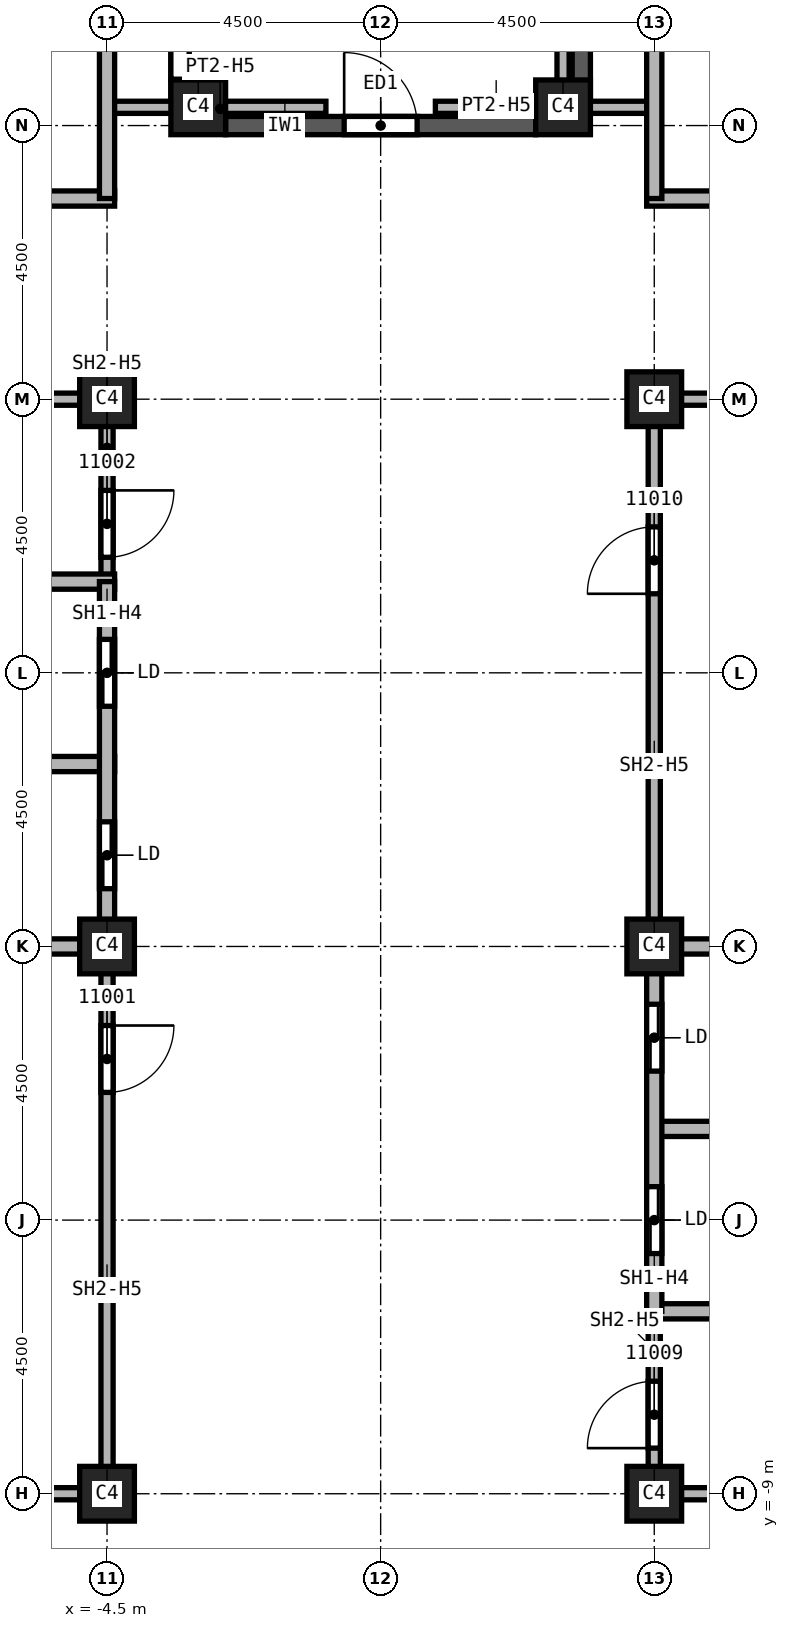
"""IFC4 building model, lengths in metres.
Left out: names, types, materials, properties, quantities, classifications, styles, units other than length and angle.
Written with IfcOpenShell. Run it as: python <this file> out.ifc"""

import sys

from ifc_helpers import new_model, si_unit, direction, frame, frame_2d, origin, origin_2d, place, context, subcontext, project, spatial, rectangle, extrude, element, fill, save


model = new_model("IFC4")
c1 = context("Model", 3, precision=1e-05, world=origin(), true_north=direction((0.0, 1.0)))
c2 = subcontext(c1, "Body", "Model", "MODEL_VIEW")
j1 = project(units=[si_unit("LENGTHUNIT", "METRE"), si_unit("PLANEANGLEUNIT", "RADIAN")], contexts=[c1])
p1 = place(None, origin())
s1 = spatial("IfcSite", under=j1, at=p1, CompositionType="ELEMENT")
p2 = place(p1, origin())
s2 = spatial("IfcBuilding", under=s1, at=p2, CompositionType="ELEMENT")
p3 = place(p2, frame((0.0, 0.0, 184.0)))
s3 = spatial("IfcBuildingStorey", under=s2, at=p3, CompositionType="ELEMENT", Elevation=184.0)
for number, where, z_axis, x_axis in (
    (1, (4.5, 0.0, 0.0), (0.0, 0.0, 1.0), (1.0, 0.0, 0.0)),
    (2, (4.5, 9.0, 0.0), (0.0, 0.0, 1.0), (1.0, 0.0, 0.0)),
    (3, (4.5, -9.0, 0.0), (0.0, 0.0, 1.0), (1.0, 0.0, 0.0)),
    (4, (-4.5, 0.0, 0.0), (0.0, 0.0, 1.0), (1.0, 0.0, 0.0)),
    (5, (-4.5, 9.0, 0.0), (0.0, 0.0, 1.0), (1.0, 0.0, 0.0)),
    (6, (-4.5, -9.0, 0.0), (0.0, 0.0, 1.0), (1.0, 0.0, 0.0)),
    (7, (3.0, 13.8, 0.0), (0.0, 0.0, 1.0), (1.0, 0.0, 0.0)),
    (8, (-3.0, 13.8, 0.0), (0.0, 0.0, 1.0), (1.0, 0.0, 0.0)),
):
    element("IfcColumn", number, at=place(p3, frame(where, z_axis=z_axis, x_axis=x_axis)), inside=s3, PredefinedType="COLUMN", context=c2, shape_type="SweptSolid", body=[
        extrude(rectangle(XDim=0.9, YDim=0.9, at=origin_2d()), origin(), (0.0, 0.0, 1.0), 3.72),
    ])
p4 = place(p3, frame((3.3, 22.3, 0.0), z_axis=(0.0, 0.0, 1.0), x_axis=(0.0, -1.0, 0.0)))
e9 = element("IfcWall", 9, at=p4, inside=s3, PredefinedType="SOLIDWALL", context=c2, shape_type="SweptSolid", body=[
    extrude(rectangle(XDim=8.45, YDim=0.3, at=frame_2d((4.225, 0.0))), origin(), (0.0, 0.0, 1.0), 3.12),
])
p5 = place(p4, frame((0.812, 0.0, 0.8)))
e10 = element("IfcOpeningElement", 10, at=p5, cuts=e9, PredefinedType="OPENING", context=c2, shape_type="SweptSolid", body=[
    extrude(rectangle(XDim=2.4, YDim=1.95, at=frame_2d((1.2, 0.975))), frame((0.0, 0.15, 0.0), z_axis=(0.0, -1.0, 0.0), x_axis=(1.0, 0.0, 0.0)), (0.0, 0.0, 1.0), 0.3),
])
p6 = place(p4, frame((4.837, 0.0, 0.8)))
e11 = element("IfcOpeningElement", 11, at=p6, cuts=e9, PredefinedType="OPENING", context=c2, shape_type="SweptSolid", body=[
    extrude(rectangle(XDim=2.4, YDim=1.95, at=frame_2d((1.2, 0.975))), frame((0.0, 0.15, 0.0), z_axis=(0.0, -1.0, 0.0), x_axis=(1.0, 0.0, 0.0)), (0.0, 0.0, 1.0), 0.3),
])
p7 = place(p3, frame((-2.55, 13.5, 0.0), z_axis=(0.0, 0.0, 1.0), x_axis=(1.0, 0.0, 0.0)))
e12 = element("IfcWall", 12, at=p7, inside=s3, PredefinedType="SOLIDWALL", context=c2, shape_type="SweptSolid", body=[
    extrude(rectangle(XDim=5.1, YDim=0.3, at=frame_2d((2.55, 0.0))), origin(), (0.0, 0.0, 1.0), 3.12),
])
p8 = place(p7, frame((1.95, 0.0, 0.0)))
e13 = element("IfcOpeningElement", 13, at=p8, cuts=e12, PredefinedType="OPENING", context=c2, shape_type="SweptSolid", body=[
    extrude(rectangle(XDim=1.2, YDim=2.4, at=frame_2d((0.6, 1.2))), frame((0.0, 0.15, 0.0), z_axis=(0.0, -1.0, 0.0), x_axis=(1.0, 0.0, 0.0)), (0.0, 0.0, 1.0), 0.3),
])
p9 = place(p3, frame((-3.3, 13.85, 0.0), z_axis=(0.0, 0.0, 1.0), x_axis=(0.0, 1.0, 0.0)))
e14 = element("IfcWall", 14, at=p9, inside=s3, PredefinedType="SOLIDWALL", context=c2, shape_type="SweptSolid", body=[
    extrude(rectangle(XDim=8.45, YDim=0.3, at=frame_2d((4.225, 0.0))), origin(), (0.0, 0.0, 1.0), 3.12),
])
p10 = place(p9, frame((0.413, 0.0, 0.8)))
e15 = element("IfcOpeningElement", 15, at=p10, cuts=e14, PredefinedType="OPENING", context=c2, shape_type="SweptSolid", body=[
    extrude(rectangle(XDim=2.4, YDim=1.95, at=frame_2d((1.2, 0.975))), frame((0.0, 0.15, 0.0), z_axis=(0.0, -1.0, 0.0), x_axis=(1.0, 0.0, 0.0)), (0.0, 0.0, 1.0), 0.3),
])
p11 = place(p9, frame((4.438, 0.0, 0.8)))
e16 = element("IfcOpeningElement", 16, at=p11, cuts=e14, PredefinedType="OPENING", context=c2, shape_type="SweptSolid", body=[
    extrude(rectangle(XDim=2.4, YDim=1.95, at=frame_2d((1.2, 0.975))), frame((0.0, 0.15, 0.0), z_axis=(0.0, -1.0, 0.0), x_axis=(1.0, 0.0, 0.0)), (0.0, 0.0, 1.0), 0.3),
])
for number, where, z_axis, x_axis in (
    (17, (-4.5, 13.8, 0.0), (0.0, 0.0, 1.0), (1.0, 0.0, 0.0)),
    (18, (0.9, 13.8, 0.0), (0.0, 0.0, 1.0), (1.0, 0.0, 0.0)),
):
    element("IfcWall", number, at=place(p3, frame(where, z_axis=z_axis, x_axis=x_axis)), inside=s3, PredefinedType="PARTITIONING", context=c2, shape_type="SweptSolid", body=[
        extrude(rectangle(XDim=3.6, YDim=0.2, at=frame_2d((1.8, 0.0))), origin(), (0.0, 0.0, 1.0), 3.113),
    ])
p12 = place(p3, frame((3.0, 22.3, 0.0), z_axis=(0.0, 0.0, 1.0), x_axis=(0.0, -1.0, 0.0)))
e19 = element("IfcWall", 19, at=p12, inside=s3, PredefinedType="PARTITIONING", context=c2, shape_type="SweptSolid", body=[
    extrude(rectangle(XDim=8.5, YDim=0.2, at=frame_2d((4.25, 0.0))), origin(), (0.0, 0.0, 1.0), 2.874),
])
for number, where, z_axis, x_axis in (
    (20, (-7.5, 9.0, 0.0), (0.0, 0.0, 1.0), (1.0, 0.0, 0.0)),
    (21, (-4.5, -9.0, 0.0), (0.0, 0.0, 1.0), (-1.0, 0.0, 0.0)),
):
    element("IfcWall", number, at=place(p3, frame(where, z_axis=z_axis, x_axis=x_axis)), inside=s3, PredefinedType="SOLIDWALL", context=c2, shape_type="SweptSolid", body=[
        extrude(rectangle(XDim=3.0, YDim=0.2, at=frame_2d((1.5, 0.0))), origin(), (0.0, 0.0, 1.0), 2.958),
    ])
p13 = place(p3, frame((-4.5, 0.0, 0.0), z_axis=(0.0, 0.0, 1.0), x_axis=(0.0, -1.0, 0.0)))
e22 = element("IfcWall", 22, at=p13, inside=s3, PredefinedType="SOLIDWALL", context=c2, shape_type="SweptSolid", body=[
    extrude(rectangle(XDim=9.1, YDim=0.2, at=frame_2d((4.55, 0.0))), origin(), (0.0, 0.0, 1.0), 2.958),
])
p14 = place(p13, frame((1.3, 0.0, 0.0)))
e23 = element("IfcOpeningElement", 23, at=p14, cuts=e22, PredefinedType="OPENING", context=c2, shape_type="SweptSolid", body=[
    extrude(rectangle(XDim=1.1, YDim=2.1, at=frame_2d((0.55, 1.05))), frame((0.0, 0.1, 0.0), z_axis=(0.0, -1.0, 0.0), x_axis=(1.0, 0.0, 0.0)), (0.0, 0.0, 1.0), 0.2),
])
p15 = place(p3, frame((-4.5, 9.1, 0.0), z_axis=(0.0, 0.0, 1.0), x_axis=(0.0, -1.0, 0.0)))
e24 = element("IfcWall", 24, at=p15, inside=s3, PredefinedType="SOLIDWALL", context=c2, shape_type="SweptSolid", body=[
    extrude(rectangle(XDim=3.1, YDim=0.2, at=frame_2d((1.55, 0.0))), origin(), (0.0, 0.0, 1.0), 2.958),
])
p16 = place(p15, frame((1.6, 0.0, 0.0)))
e25 = element("IfcOpeningElement", 25, at=p16, cuts=e24, PredefinedType="OPENING", context=c2, shape_type="SweptSolid", body=[
    extrude(rectangle(XDim=1.1, YDim=2.1, at=frame_2d((0.55, 1.05))), frame((0.0, 0.1, 0.0), z_axis=(0.0, -1.0, 0.0), x_axis=(1.0, 0.0, 0.0)), (0.0, 0.0, 1.0), 0.2),
])
p17 = place(p3, frame((4.5, -9.1, 0.0), z_axis=(0.0, 0.0, 1.0), x_axis=(0.0, 1.0, 0.0)))
e26 = element("IfcWall", 26, at=p17, inside=s3, PredefinedType="SOLIDWALL", context=c2, shape_type="SweptSolid", body=[
    extrude(rectangle(XDim=3.1, YDim=0.2, at=frame_2d((1.55, 0.0))), origin(), (0.0, 0.0, 1.0), 2.958),
])
p18 = place(p17, frame((0.85, 0.0, 0.0)))
e27 = element("IfcOpeningElement", 27, at=p18, cuts=e26, PredefinedType="OPENING", context=c2, shape_type="SweptSolid", body=[
    extrude(rectangle(XDim=1.1, YDim=2.1, at=frame_2d((0.55, 1.05))), frame((0.0, 0.1, 0.0), z_axis=(0.0, -1.0, 0.0), x_axis=(1.0, 0.0, 0.0)), (0.0, 0.0, 1.0), 0.2),
])
p19 = place(p3, frame((4.5, 0.0, 0.0), z_axis=(0.0, 0.0, 1.0), x_axis=(0.0, 1.0, 0.0)))
e28 = element("IfcWall", 28, at=p19, inside=s3, PredefinedType="SOLIDWALL", context=c2, shape_type="SweptSolid", body=[
    extrude(rectangle(XDim=9.1, YDim=0.2, at=frame_2d((4.55, 0.0))), origin(), (0.0, 0.0, 1.0), 2.958),
])
p20 = place(p19, frame((5.8, 0.0, 0.0)))
e29 = element("IfcOpeningElement", 29, at=p20, cuts=e28, PredefinedType="OPENING", context=c2, shape_type="SweptSolid", body=[
    extrude(rectangle(XDim=1.1, YDim=2.1, at=frame_2d((0.55, 1.05))), frame((0.0, 0.1, 0.0), z_axis=(0.0, -1.0, 0.0), x_axis=(1.0, 0.0, 0.0)), (0.0, 0.0, 1.0), 0.2),
])
for number, where, z_axis, x_axis in (
    (30, (4.5, 9.0, 0.0), (0.0, 0.0, 1.0), (1.0, 0.0, 0.0)),
    (31, (7.5, -9.0, 0.0), (0.0, 0.0, 1.0), (-1.0, 0.0, 0.0)),
):
    element("IfcWall", number, at=place(p3, frame(where, z_axis=z_axis, x_axis=x_axis)), inside=s3, PredefinedType="SOLIDWALL", context=c2, shape_type="SweptSolid", body=[
        extrude(rectangle(XDim=3.0, YDim=0.2, at=frame_2d((1.5, 0.0))), origin(), (0.0, 0.0, 1.0), 2.958),
    ])
p21 = place(p3, frame((-13.625, 3.0, 0.0), z_axis=(0.0, 0.0, 1.0), x_axis=(1.0, 0.0, 0.0)))
e32 = element("IfcWall", 32, at=p21, inside=s3, PredefinedType="SOLIDWALL", context=c2, shape_type="SweptSolid", body=[
    extrude(rectangle(XDim=9.25, YDim=0.25, at=frame_2d((4.625, 0.0))), origin(), (0.0, 0.0, 1.0), 3.72),
])
p22 = place(p21, frame((3.25, 0.0, 0.0)))
e33 = element("IfcOpeningElement", 33, at=p22, cuts=e32, PredefinedType="OPENING", context=c2, shape_type="SweptSolid", body=[
    extrude(rectangle(XDim=1.1, YDim=2.1, at=frame_2d((0.55, 1.05))), frame((0.0, 0.125, 0.0), z_axis=(0.0, -1.0, 0.0), x_axis=(1.0, 0.0, 0.0)), (0.0, 0.0, 1.0), 0.25),
])
for number, where, z_axis, x_axis in (
    (34, (-7.625, 0.0, 0.0), (0.0, 0.0, 1.0), (1.0, 0.0, 0.0)),
    (35, (-7.625, 6.0, 0.0), (0.0, 0.0, 1.0), (1.0, 0.0, 0.0)),
):
    element("IfcWall", number, at=place(p3, frame(where, z_axis=z_axis, x_axis=x_axis)), inside=s3, PredefinedType="SOLIDWALL", context=c2, shape_type="SweptSolid", body=[
        extrude(rectangle(XDim=3.25, YDim=0.25, at=frame_2d((1.625, 0.0))), origin(), (0.0, 0.0, 1.0), 3.72),
    ])
p23 = place(p3, frame((-4.5, 6.0, 0.0), z_axis=(0.0, 0.0, 1.0), x_axis=(0.0, -1.0, 0.0)))
e36 = element("IfcWall", 36, at=p23, inside=s3, PredefinedType="SOLIDWALL", context=c2, shape_type="SweptSolid", body=[
    extrude(rectangle(XDim=6.0, YDim=0.25, at=frame_2d((3.0, 0.0))), origin(), (0.0, 0.0, 1.0), 2.958),
])
p24 = place(p23, frame((3.95, 0.0, 0.0)))
e37 = element("IfcOpeningElement", 37, at=p24, cuts=e36, PredefinedType="OPENING", context=c2, shape_type="SweptSolid", body=[
    extrude(rectangle(XDim=1.1, YDim=2.1, at=frame_2d((0.55, 1.05))), frame((0.0, 0.125, 0.0), z_axis=(0.0, -1.0, 0.0), x_axis=(1.0, 0.0, 0.0)), (0.0, 0.0, 1.0), 0.25),
])
p25 = place(p23, frame((0.95, 0.0, 0.0)))
e38 = element("IfcOpeningElement", 38, at=p25, cuts=e36, PredefinedType="OPENING", context=c2, shape_type="SweptSolid", body=[
    extrude(rectangle(XDim=1.1, YDim=2.1, at=frame_2d((0.55, 1.05))), frame((0.0, 0.125, 0.0), z_axis=(0.0, -1.0, 0.0), x_axis=(1.0, 0.0, 0.0)), (0.0, 0.0, 1.0), 0.25),
])
p26 = place(p3, frame((4.375, -6.0, 0.0), z_axis=(0.0, 0.0, 1.0), x_axis=(1.0, 0.0, 0.0)))
e39 = element("IfcWall", 39, at=p26, inside=s3, PredefinedType="SOLIDWALL", context=c2, shape_type="SweptSolid", body=[
    extrude(rectangle(XDim=3.25, YDim=0.25, at=frame_2d((1.625, 0.0))), origin(), (0.0, 0.0, 1.0), 3.72),
])
p27 = place(p3, frame((4.375, -3.0, 0.0), z_axis=(0.0, 0.0, 1.0), x_axis=(1.0, 0.0, 0.0)))
e40 = element("IfcWall", 40, at=p27, inside=s3, PredefinedType="SOLIDWALL", context=c2, shape_type="SweptSolid", body=[
    extrude(rectangle(XDim=9.25, YDim=0.25, at=frame_2d((4.625, 0.0))), origin(), (0.0, 0.0, 1.0), 3.72),
])
p28 = place(p27, frame((4.125, 0.0, 0.0)))
e41 = element("IfcOpeningElement", 41, at=p28, cuts=e40, PredefinedType="OPENING", context=c2, shape_type="SweptSolid", body=[
    extrude(rectangle(XDim=1.1, YDim=2.1, at=frame_2d((0.55, 1.05))), frame((0.0, 0.125, 0.0), z_axis=(0.0, -1.0, 0.0), x_axis=(1.0, 0.0, 0.0)), (0.0, 0.0, 1.0), 0.25),
])
p29 = place(p3, frame((4.375, 0.0, 0.0), z_axis=(0.0, 0.0, 1.0), x_axis=(1.0, 0.0, 0.0)))
e42 = element("IfcWall", 42, at=p29, inside=s3, PredefinedType="SOLIDWALL", context=c2, shape_type="SweptSolid", body=[
    extrude(rectangle(XDim=3.25, YDim=0.25, at=frame_2d((1.625, 0.0))), origin(), (0.0, 0.0, 1.0), 3.72),
])
p30 = place(p3, frame((4.5, -6.0, 0.0), z_axis=(0.0, 0.0, 1.0), x_axis=(0.0, 1.0, 0.0)))
e43 = element("IfcWall", 43, at=p30, inside=s3, PredefinedType="SOLIDWALL", context=c2, shape_type="SweptSolid", body=[
    extrude(rectangle(XDim=6.0, YDim=0.25, at=frame_2d((3.0, 0.0))), origin(), (0.0, 0.0, 1.0), 2.958),
])
p31 = place(p30, frame((0.95, 0.0, 0.0)))
e44 = element("IfcOpeningElement", 44, at=p31, cuts=e43, PredefinedType="OPENING", context=c2, shape_type="SweptSolid", body=[
    extrude(rectangle(XDim=1.1, YDim=2.1, at=frame_2d((0.55, 1.05))), frame((0.0, 0.125, 0.0), z_axis=(0.0, -1.0, 0.0), x_axis=(1.0, 0.0, 0.0)), (0.0, 0.0, 1.0), 0.25),
])
p32 = place(p30, frame((3.95, 0.0, 0.0)))
e45 = element("IfcOpeningElement", 45, at=p32, cuts=e43, PredefinedType="OPENING", context=c2, shape_type="SweptSolid", body=[
    extrude(rectangle(XDim=1.1, YDim=2.1, at=frame_2d((0.55, 1.05))), frame((0.0, 0.125, 0.0), z_axis=(0.0, -1.0, 0.0), x_axis=(1.0, 0.0, 0.0)), (0.0, 0.0, 1.0), 0.25),
])
p33 = place(p3, frame((-13.625, 12.3, 0.0), z_axis=(0.0, 0.0, 1.0), x_axis=(1.0, 0.0, 0.0)))
e46 = element("IfcWall", 46, at=p33, inside=s3, PredefinedType="SOLIDWALL", context=c2, shape_type="SweptSolid", body=[
    extrude(rectangle(XDim=9.25, YDim=0.25, at=frame_2d((4.625, 0.0))), origin(), (0.0, 0.0, 1.0), 3.72),
])
p34 = place(p33, frame((0.85, 0.0, 0.0)))
e47 = element("IfcOpeningElement", 47, at=p34, cuts=e46, PredefinedType="OPENING", context=c2, shape_type="SweptSolid", body=[
    extrude(rectangle(XDim=1.2, YDim=2.1, at=frame_2d((0.6, 1.05))), frame((0.0, 0.125, 0.0), z_axis=(0.0, -1.0, 0.0), x_axis=(1.0, 0.0, 0.0)), (0.0, 0.0, 1.0), 0.25),
])
p35 = place(p3, frame((-4.5, 16.8, 0.0), z_axis=(0.0, 0.0, 1.0), x_axis=(0.0, -1.0, 0.0)))
e48 = element("IfcWall", 48, at=p35, inside=s3, PredefinedType="SOLIDWALL", context=c2, shape_type="SweptSolid", body=[
    extrude(rectangle(XDim=4.5, YDim=0.25, at=frame_2d((2.25, 0.0))), origin(), (0.0, 0.0, 1.0), 3.72),
])
p36 = place(p3, frame((4.375, 12.3, 0.0), z_axis=(0.0, 0.0, 1.0), x_axis=(1.0, 0.0, 0.0)))
e49 = element("IfcWall", 49, at=p36, inside=s3, PredefinedType="SOLIDWALL", context=c2, shape_type="SweptSolid", body=[
    extrude(rectangle(XDim=9.25, YDim=0.25, at=frame_2d((4.625, 0.0))), origin(), (0.0, 0.0, 1.0), 3.72),
])
p37 = place(p36, frame((7.2, 0.0, 0.0)))
e50 = element("IfcOpeningElement", 50, at=p37, cuts=e49, PredefinedType="OPENING", context=c2, shape_type="SweptSolid", body=[
    extrude(rectangle(XDim=1.2, YDim=2.1, at=frame_2d((0.6, 1.05))), frame((0.0, 0.125, 0.0), z_axis=(0.0, -1.0, 0.0), x_axis=(1.0, 0.0, 0.0)), (0.0, 0.0, 1.0), 0.25),
])
p38 = place(p3, frame((4.5, 12.3, 0.0), z_axis=(0.0, 0.0, 1.0), x_axis=(0.0, 1.0, 0.0)))
e51 = element("IfcWall", 51, at=p38, inside=s3, PredefinedType="SOLIDWALL", context=c2, shape_type="SweptSolid", body=[
    extrude(rectangle(XDim=4.5, YDim=0.25, at=frame_2d((2.25, 0.0))), origin(), (0.0, 0.0, 1.0), 3.72),
])
p39 = place(p8, origin())
e52 = element("IfcDoor", 52, at=p39, inside=s3, OperationType="SINGLE_SWING_LEFT", PredefinedType="DOOR", context=c2, shape_type="SweptSolid", body=[
    extrude(rectangle(XDim=1.2, YDim=2.4, at=frame_2d((0.6, 1.2))), frame((0.0, 0.025, 0.0), z_axis=(0.0, -1.0, 0.0), x_axis=(1.0, 0.0, 0.0)), (0.0, 0.0, 1.0), 0.05),
])
fill(e13, e52)
p40 = place(p10, origin())
e53 = element("IfcWindow", 53, at=p40, inside=s3, PartitioningType="SINGLE_PANEL", PredefinedType="WINDOW", context=c2, shape_type="SweptSolid", body=[
    extrude(rectangle(XDim=2.4, YDim=1.95, at=frame_2d((1.2, 0.975))), frame((0.0, 0.03, 0.0), z_axis=(0.0, -1.0, 0.0), x_axis=(1.0, 0.0, 0.0)), (0.0, 0.0, 1.0), 0.06),
])
fill(e15, e53)
p41 = place(p14, origin())
e54 = element("IfcDoor", 54, at=p41, inside=s3, OperationType="SINGLE_SWING_RIGHT", PredefinedType="DOOR", context=c2, shape_type="SweptSolid", body=[
    extrude(rectangle(XDim=1.1, YDim=2.1, at=frame_2d((0.55, 1.05))), frame((0.0, 0.025, 0.0), z_axis=(0.0, -1.0, 0.0), x_axis=(1.0, 0.0, 0.0)), (0.0, 0.0, 1.0), 0.05),
])
fill(e23, e54)
p42 = place(p16, origin())
e55 = element("IfcDoor", 55, at=p42, inside=s3, OperationType="SINGLE_SWING_LEFT", PredefinedType="DOOR", context=c2, shape_type="SweptSolid", body=[
    extrude(rectangle(XDim=1.1, YDim=2.1, at=frame_2d((0.55, 1.05))), frame((0.0, 0.025, 0.0), z_axis=(0.0, -1.0, 0.0), x_axis=(1.0, 0.0, 0.0)), (0.0, 0.0, 1.0), 0.05),
])
fill(e25, e55)
p43 = place(p18, origin())
e56 = element("IfcDoor", 56, at=p43, inside=s3, OperationType="SINGLE_SWING_RIGHT", PredefinedType="DOOR", context=c2, shape_type="SweptSolid", body=[
    extrude(rectangle(XDim=1.1, YDim=2.1, at=frame_2d((0.55, 1.05))), frame((0.0, 0.025, 0.0), z_axis=(0.0, -1.0, 0.0), x_axis=(1.0, 0.0, 0.0)), (0.0, 0.0, 1.0), 0.05),
])
fill(e27, e56)
p44 = place(p20, origin())
e57 = element("IfcDoor", 57, at=p44, inside=s3, OperationType="SINGLE_SWING_LEFT", PredefinedType="DOOR", context=c2, shape_type="SweptSolid", body=[
    extrude(rectangle(XDim=1.1, YDim=2.1, at=frame_2d((0.55, 1.05))), frame((0.0, 0.025, 0.0), z_axis=(0.0, -1.0, 0.0), x_axis=(1.0, 0.0, 0.0)), (0.0, 0.0, 1.0), 0.05),
])
fill(e29, e57)
p45 = place(p24, origin())
e58 = element("IfcDoor", 58, at=p45, inside=s3, OperationType="SLIDING_TO_LEFT", PredefinedType="DOOR", context=c2, shape_type="SweptSolid", body=[
    extrude(rectangle(XDim=1.1, YDim=2.1, at=frame_2d((0.55, 1.05))), frame((0.0, 0.025, 0.0), z_axis=(0.0, -1.0, 0.0), x_axis=(1.0, 0.0, 0.0)), (0.0, 0.0, 1.0), 0.05),
])
fill(e37, e58)
p46 = place(p25, origin())
e59 = element("IfcDoor", 59, at=p46, inside=s3, OperationType="SLIDING_TO_LEFT", PredefinedType="DOOR", context=c2, shape_type="SweptSolid", body=[
    extrude(rectangle(XDim=1.1, YDim=2.1, at=frame_2d((0.55, 1.05))), frame((0.0, 0.025, 0.0), z_axis=(0.0, -1.0, 0.0), x_axis=(1.0, 0.0, 0.0)), (0.0, 0.0, 1.0), 0.05),
])
fill(e38, e59)
p47 = place(p31, origin())
e60 = element("IfcDoor", 60, at=p47, inside=s3, OperationType="SLIDING_TO_LEFT", PredefinedType="DOOR", context=c2, shape_type="SweptSolid", body=[
    extrude(rectangle(XDim=1.1, YDim=2.1, at=frame_2d((0.55, 1.05))), frame((0.0, 0.025, 0.0), z_axis=(0.0, -1.0, 0.0), x_axis=(1.0, 0.0, 0.0)), (0.0, 0.0, 1.0), 0.05),
])
fill(e44, e60)
p48 = place(p32, origin())
e61 = element("IfcDoor", 61, at=p48, inside=s3, OperationType="SLIDING_TO_LEFT", PredefinedType="DOOR", context=c2, shape_type="SweptSolid", body=[
    extrude(rectangle(XDim=1.1, YDim=2.1, at=frame_2d((0.55, 1.05))), frame((0.0, 0.025, 0.0), z_axis=(0.0, -1.0, 0.0), x_axis=(1.0, 0.0, 0.0)), (0.0, 0.0, 1.0), 0.05),
])
fill(e45, e61)
save(model, sys.argv[1])
